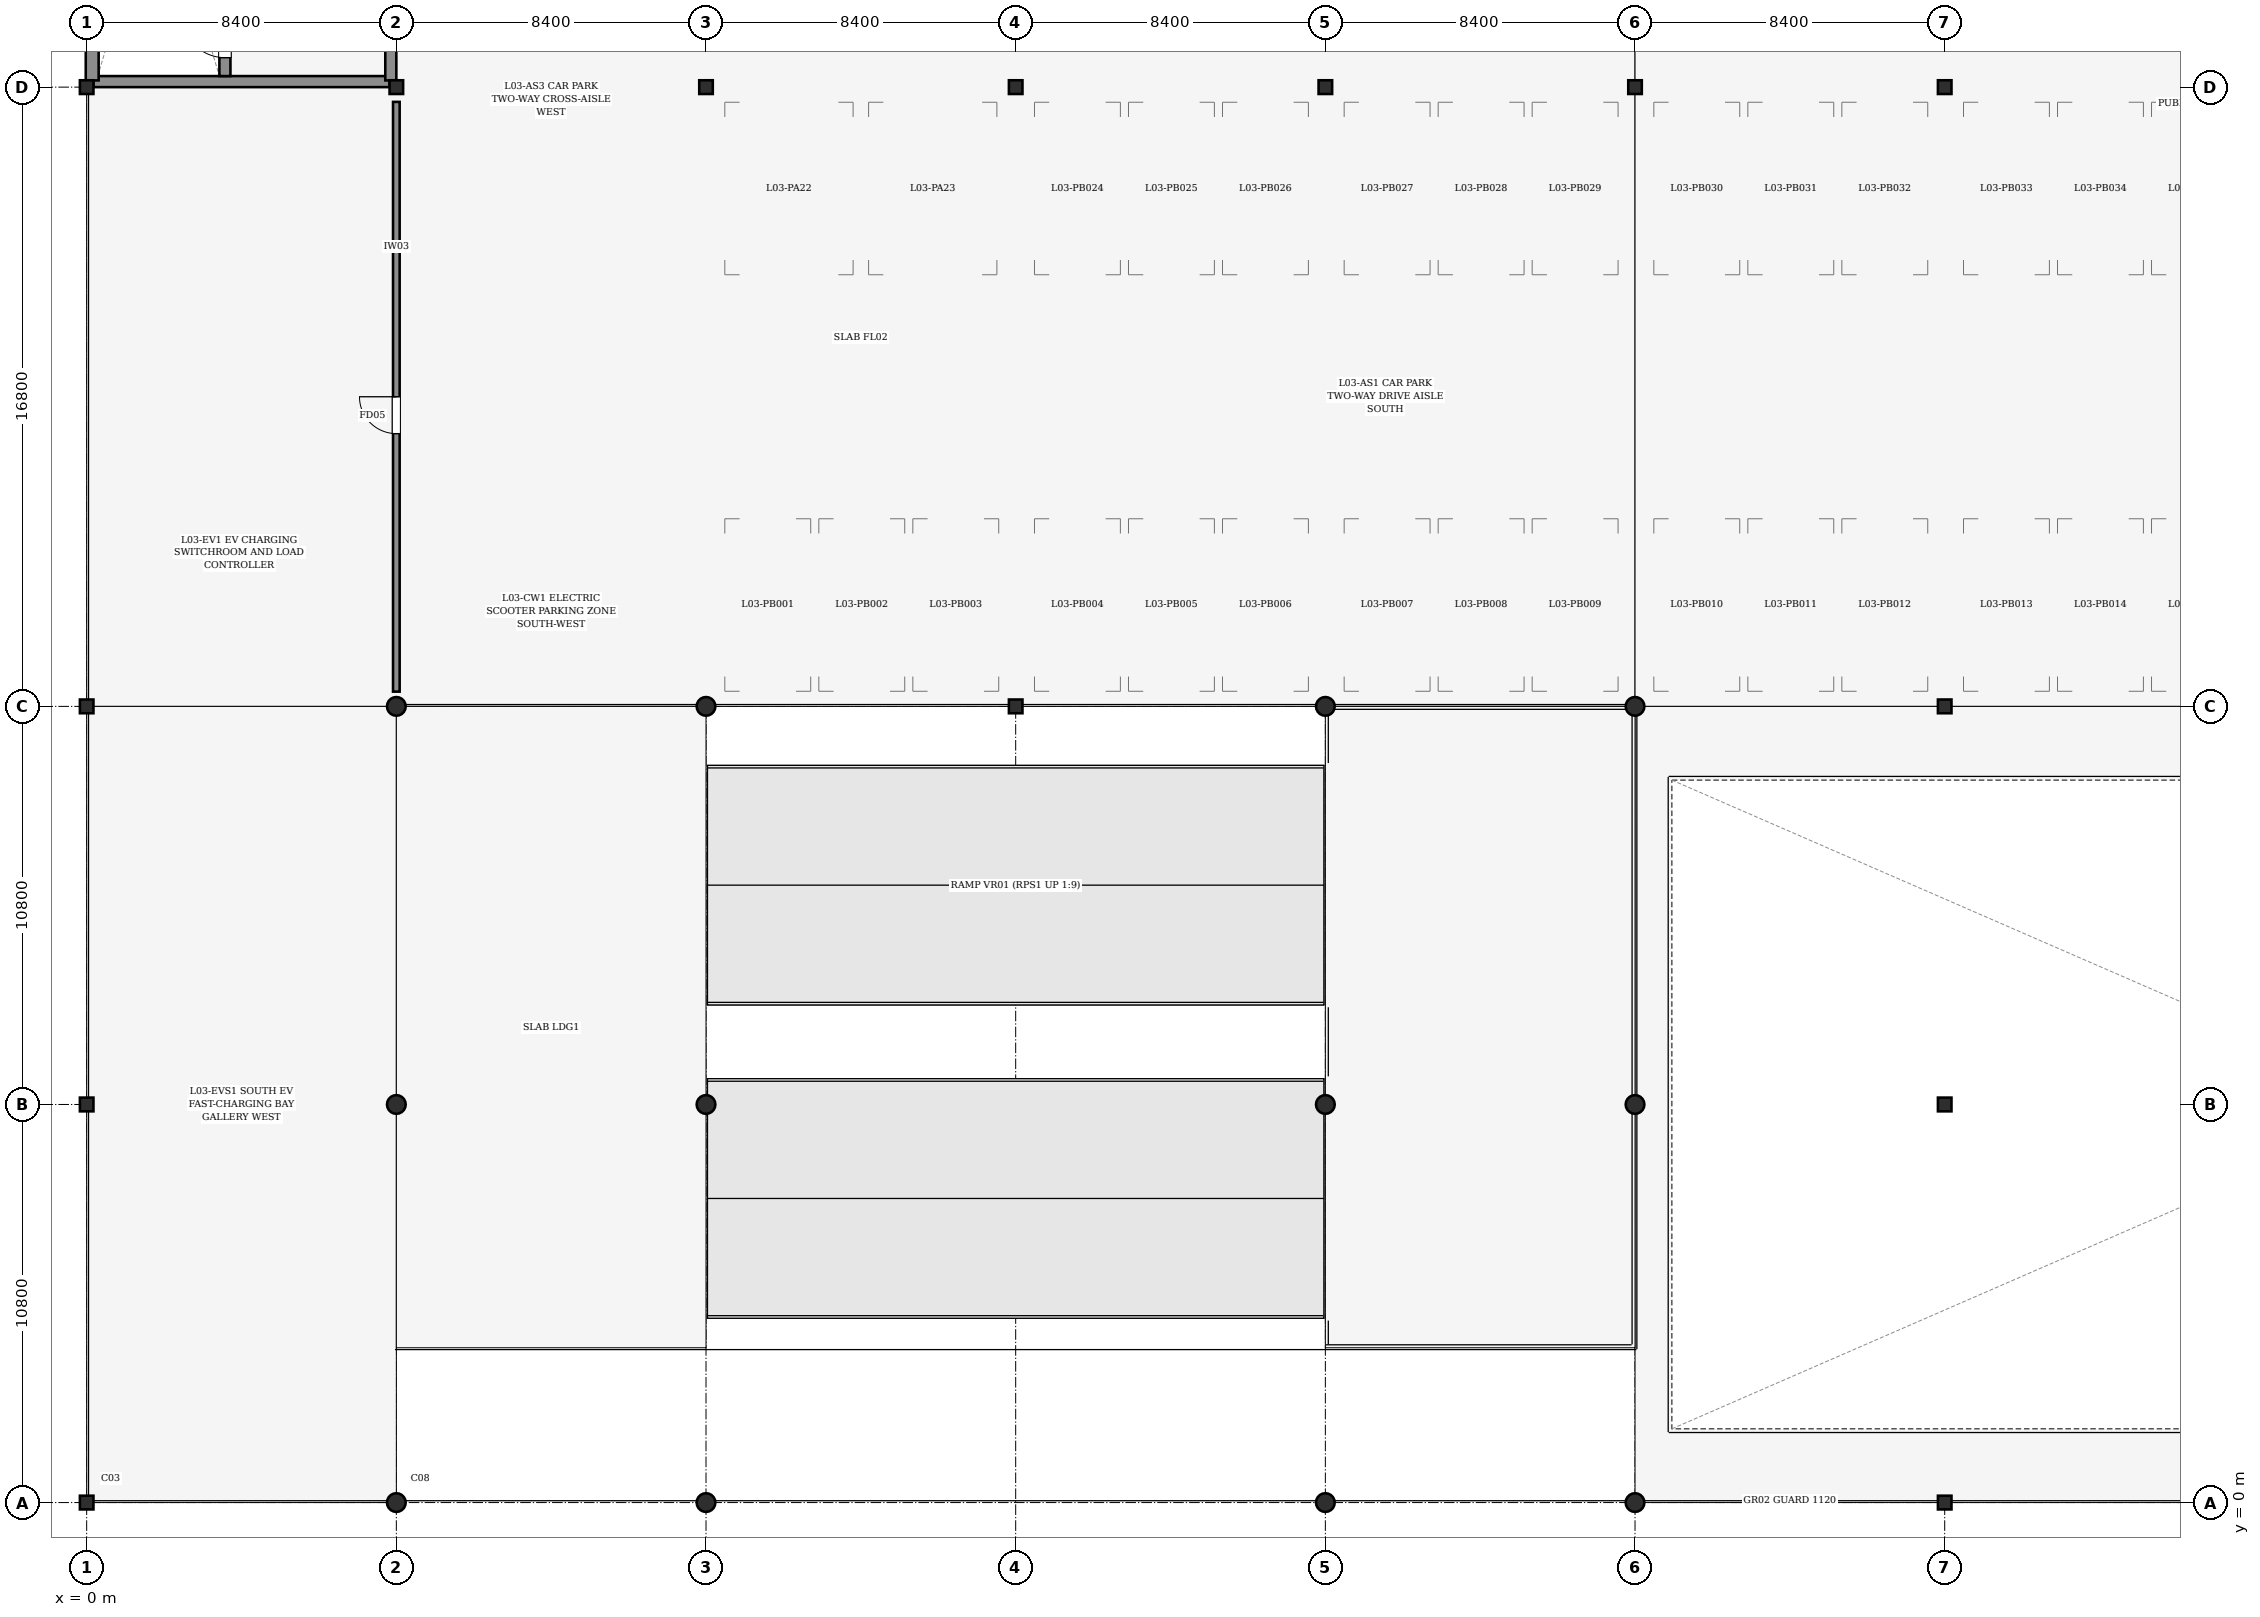
"""IFC4 building model, lengths in metres.
Left out: names, types, materials, properties, quantities, classifications, styles, units other than length and angle.
Written with IfcOpenShell. Run it as: python <this file> out.ifc"""

import sys

from ifc_helpers import new_model, si_unit, direction, frame, frame_2d, origin, origin_2d, place, context, subcontext, project, spatial, rectangle, hollow_circle, i_section, extrude, element, fill, save


model = new_model("IFC4")
c1 = context("Model", 3, precision=1e-05, world=origin(), true_north=direction((0.0, 1.0)))
c2 = subcontext(c1, "Body", "Model", "MODEL_VIEW")
j1 = project(units=[si_unit("LENGTHUNIT", "METRE"), si_unit("PLANEANGLEUNIT", "RADIAN")], contexts=[c1])
p1 = place(None, origin())
s1 = spatial("IfcSite", under=j1, at=p1, CompositionType="ELEMENT")
p2 = place(p1, origin())
s2 = spatial("IfcBuilding", under=s1, at=p2, CompositionType="ELEMENT")
p3 = place(p2, frame((0.0, 0.0, 12.6)))
s3 = spatial("IfcBuildingStorey", under=s2, at=p3, CompositionType="ELEMENT", Elevation=12.6)
for number, where, z_axis, x_axis in (
    (1, (0.0, 0.0, 0.0), (0.0, 0.0, 1.0), (1.0, 0.0, 0.0)),
    (2, (0.0, 10.8, 0.0), (0.0, 0.0, 1.0), (1.0, 0.0, 0.0)),
    (3, (0.0, 21.6, 0.0), (0.0, 0.0, 1.0), (1.0, 0.0, 0.0)),
    (4, (0.0, 38.4, 0.0), (0.0, 0.0, 1.0), (1.0, 0.0, 0.0)),
):
    element("IfcColumn", number, at=place(p3, frame(where, z_axis=z_axis, x_axis=x_axis)), inside=s3, PredefinedType="COLUMN", context=c2, shape_type="SweptSolid", body=[
        extrude(i_section(OverallWidth=0.373, OverallDepth=0.368, WebThickness=0.014, FlangeThickness=0.024, FilletRadius=0.015, at=origin_2d()), origin(), (0.0, 0.0, 1.0), 3.6),
    ])
for number, where, z_axis, x_axis in (
    (5, (8.4, 0.0, 0.0), (0.0, 0.0, 1.0), (1.0, 0.0, 0.0)),
    (6, (8.4, 10.8, 0.0), (0.0, 0.0, 1.0), (1.0, 0.0, 0.0)),
    (7, (8.4, 21.6, 0.0), (0.0, 0.0, 1.0), (1.0, 0.0, 0.0)),
):
    element("IfcColumn", number, at=place(p3, frame(where, z_axis=z_axis, x_axis=x_axis)), inside=s3, PredefinedType="COLUMN", context=c2, shape_type="SweptSolid", body=[
        extrude(hollow_circle(Radius=0.254, WallThickness=0.016, at=origin_2d()), origin(), (0.0, 0.0, 1.0), 3.6),
    ])
p4 = place(p3, frame((8.4, 38.4, 0.0), z_axis=(0.0, 0.0, 1.0), x_axis=(1.0, 0.0, 0.0)))
e8 = element("IfcColumn", 8, at=p4, inside=s3, PredefinedType="COLUMN", context=c2, shape_type="SweptSolid", body=[
    extrude(i_section(OverallWidth=0.373, OverallDepth=0.368, WebThickness=0.014, FlangeThickness=0.024, FilletRadius=0.015, at=origin_2d()), origin(), (0.0, 0.0, 1.0), 3.6),
])
for number, where, z_axis, x_axis in (
    (9, (16.8, 0.0, 0.0), (0.0, 0.0, 1.0), (1.0, 0.0, 0.0)),
    (10, (16.8, 10.8, 0.0), (0.0, 0.0, 1.0), (1.0, 0.0, 0.0)),
    (11, (16.8, 21.6, 0.0), (0.0, 0.0, 1.0), (1.0, 0.0, 0.0)),
):
    element("IfcColumn", number, at=place(p3, frame(where, z_axis=z_axis, x_axis=x_axis)), inside=s3, PredefinedType="COLUMN", context=c2, shape_type="SweptSolid", body=[
        extrude(hollow_circle(Radius=0.254, WallThickness=0.016, at=origin_2d()), origin(), (0.0, 0.0, 1.0), 3.6),
    ])
for number, where, z_axis, x_axis in (
    (12, (16.8, 38.4, 0.0), (0.0, 0.0, 1.0), (1.0, 0.0, 0.0)),
    (13, (25.2, 21.6, 0.0), (0.0, 0.0, 1.0), (1.0, 0.0, 0.0)),
    (14, (25.2, 38.4, 0.0), (0.0, 0.0, 1.0), (1.0, 0.0, 0.0)),
):
    element("IfcColumn", number, at=place(p3, frame(where, z_axis=z_axis, x_axis=x_axis)), inside=s3, PredefinedType="COLUMN", context=c2, shape_type="SweptSolid", body=[
        extrude(i_section(OverallWidth=0.373, OverallDepth=0.368, WebThickness=0.014, FlangeThickness=0.024, FilletRadius=0.015, at=origin_2d()), origin(), (0.0, 0.0, 1.0), 3.6),
    ])
for number, where, z_axis, x_axis in (
    (15, (33.6, 0.0, 0.0), (0.0, 0.0, 1.0), (1.0, 0.0, 0.0)),
    (16, (33.6, 10.8, 0.0), (0.0, 0.0, 1.0), (1.0, 0.0, 0.0)),
    (17, (33.6, 21.6, 0.0), (0.0, 0.0, 1.0), (1.0, 0.0, 0.0)),
):
    element("IfcColumn", number, at=place(p3, frame(where, z_axis=z_axis, x_axis=x_axis)), inside=s3, PredefinedType="COLUMN", context=c2, shape_type="SweptSolid", body=[
        extrude(hollow_circle(Radius=0.254, WallThickness=0.016, at=origin_2d()), origin(), (0.0, 0.0, 1.0), 3.6),
    ])
p5 = place(p3, frame((33.6, 38.4, 0.0), z_axis=(0.0, 0.0, 1.0), x_axis=(1.0, 0.0, 0.0)))
e18 = element("IfcColumn", 18, at=p5, inside=s3, PredefinedType="COLUMN", context=c2, shape_type="SweptSolid", body=[
    extrude(i_section(OverallWidth=0.373, OverallDepth=0.368, WebThickness=0.014, FlangeThickness=0.024, FilletRadius=0.015, at=origin_2d()), origin(), (0.0, 0.0, 1.0), 3.6),
])
for number, where, z_axis, x_axis in (
    (19, (42.0, 0.0, 0.0), (0.0, 0.0, 1.0), (1.0, 0.0, 0.0)),
    (20, (42.0, 10.8, 0.0), (0.0, 0.0, 1.0), (1.0, 0.0, 0.0)),
    (21, (42.0, 21.6, 0.0), (0.0, 0.0, 1.0), (1.0, 0.0, 0.0)),
):
    element("IfcColumn", number, at=place(p3, frame(where, z_axis=z_axis, x_axis=x_axis)), inside=s3, PredefinedType="COLUMN", context=c2, shape_type="SweptSolid", body=[
        extrude(hollow_circle(Radius=0.254, WallThickness=0.016, at=origin_2d()), origin(), (0.0, 0.0, 1.0), 3.6),
    ])
for number, where, z_axis, x_axis in (
    (22, (42.0, 38.4, 0.0), (0.0, 0.0, 1.0), (1.0, 0.0, 0.0)),
    (23, (50.4, 0.0, 0.0), (0.0, 0.0, 1.0), (1.0, 0.0, 0.0)),
    (24, (50.4, 10.8, 0.0), (0.0, 0.0, 1.0), (1.0, 0.0, 0.0)),
    (25, (50.4, 21.6, 0.0), (0.0, 0.0, 1.0), (1.0, 0.0, 0.0)),
    (26, (50.4, 38.4, 0.0), (0.0, 0.0, 1.0), (1.0, 0.0, 0.0)),
):
    element("IfcColumn", number, at=place(p3, frame(where, z_axis=z_axis, x_axis=x_axis)), inside=s3, PredefinedType="COLUMN", context=c2, shape_type="SweptSolid", body=[
        extrude(i_section(OverallWidth=0.373, OverallDepth=0.368, WebThickness=0.014, FlangeThickness=0.024, FilletRadius=0.015, at=origin_2d()), origin(), (0.0, 0.0, 1.0), 3.6),
    ])
p6 = place(p3, frame((0.185, 38.55, 0.0), z_axis=(0.0, 0.0, 1.0), x_axis=(1.0, 0.0, 0.0)))
e27 = element("IfcWall", 27, at=p6, inside=s3, PredefinedType="SHEAR", context=c2, shape_type="SweptSolid", body=[
    extrude(rectangle(XDim=8.031, YDim=0.3, at=frame_2d((4.016, 0.0))), origin(), (0.0, 0.0, 1.0), 3.38),
])
p7 = place(p3, frame((0.15, 38.582, 0.0), z_axis=(0.0, 0.0, 1.0), x_axis=(0.0, 1.0, 0.0)))
e28 = element("IfcWall", 28, at=p7, inside=s3, PredefinedType="SHEAR", context=c2, shape_type="SweptSolid", body=[
    extrude(rectangle(XDim=16.436, YDim=0.35, at=frame_2d((8.218, 0.0))), origin(), (0.0, 0.0, 1.0), 3.38),
])
p8 = place(p3, frame((8.25, 38.582, 0.0), z_axis=(0.0, 0.0, 1.0), x_axis=(0.0, 1.0, 0.0)))
e29 = element("IfcWall", 29, at=p8, inside=s3, PredefinedType="SHEAR", context=c2, shape_type="SweptSolid", body=[
    extrude(rectangle(XDim=16.436, YDim=0.3, at=frame_2d((8.218, 0.0))), origin(), (0.0, 0.0, 1.0), 3.38),
])
p9 = place(p8, frame((5.668, 0.0, 0.0)))
e30 = element("IfcOpeningElement", 30, at=p9, cuts=e29, PredefinedType="OPENING", context=c2, shape_type="SweptSolid", body=[
    extrude(rectangle(XDim=1.3, YDim=2.2, at=frame_2d((0.65, 1.1))), frame((0.0, 0.16, 0.0), z_axis=(0.0, -1.0, 0.0), x_axis=(1.0, 0.0, 0.0)), (0.0, 0.0, 1.0), 0.32),
])
p10 = place(p3, frame((3.75, 38.7, 0.0), z_axis=(0.0, 0.0, 1.0), x_axis=(0.0, 1.0, 0.0)))
e31 = element("IfcWall", 31, at=p10, inside=s3, PredefinedType="SHEAR", context=c2, shape_type="SweptSolid", body=[
    extrude(rectangle(XDim=16.2, YDim=0.3, at=frame_2d((8.1, 0.0))), origin(), (0.0, 0.0, 1.0), 3.38),
])
p11 = place(p10, frame((0.5, 0.0, 0.0)))
e32 = element("IfcOpeningElement", 32, at=p11, cuts=e31, PredefinedType="OPENING", context=c2, shape_type="SweptSolid", body=[
    extrude(rectangle(XDim=1.15, YDim=2.15, at=frame_2d((0.575, 1.075))), frame((0.0, 0.16, 0.0), z_axis=(0.0, -1.0, 0.0), x_axis=(1.0, 0.0, 0.0)), (0.0, 0.0, 1.0), 0.32),
])
p12 = place(p3, frame((8.4, 22.0, 0.0), z_axis=(0.0, 0.0, 1.0), x_axis=(0.0, 1.0, 0.0)))
e33 = element("IfcWall", 33, at=p12, inside=s3, PredefinedType="PARTITIONING", context=c2, shape_type="SweptSolid", body=[
    extrude(rectangle(XDim=16.0, YDim=0.18, at=frame_2d((8.0, 0.0))), origin(), (0.0, 0.0, 1.0), 2.525),
])
p13 = place(p12, frame((7.0, 0.0, 0.0)))
e34 = element("IfcOpeningElement", 34, at=p13, cuts=e33, PredefinedType="OPENING", context=c2, shape_type="SweptSolid", body=[
    extrude(rectangle(XDim=1.0, YDim=2.15, at=frame_2d((0.5, 1.075))), frame((0.0, 0.1, 0.0), z_axis=(0.0, -1.0, 0.0), x_axis=(1.0, 0.0, 0.0)), (0.0, 0.0, 1.0), 0.2),
])
p14 = place(p11, frame((1.15, 0.0, 0.0), z_axis=(0.0, 0.0, 1.0), x_axis=(-1.0, 0.0, 0.0)))
e35 = element("IfcDoor", 35, at=p14, inside=s3, OperationType="SINGLE_SWING_LEFT", PredefinedType="DOOR", context=c2, shape_type="SweptSolid", body=[
    extrude(rectangle(XDim=1.15, YDim=2.15, at=frame_2d((0.575, 1.075))), frame((0.0, 0.025, 0.0), z_axis=(0.0, -1.0, 0.0), x_axis=(1.0, 0.0, 0.0)), (0.0, 0.0, 1.0), 0.05),
])
fill(e32, e35)
p15 = place(p13, origin())
e36 = element("IfcDoor", 36, at=p15, inside=s3, OperationType="SINGLE_SWING_RIGHT", PredefinedType="DOOR", context=c2, shape_type="SweptSolid", body=[
    extrude(rectangle(XDim=1.0, YDim=2.15, at=frame_2d((0.5, 1.075))), frame((0.0, 0.025, 0.0), z_axis=(0.0, -1.0, 0.0), x_axis=(1.0, 0.0, 0.0)), (0.0, 0.0, 1.0), 0.05),
])
fill(e34, e36)
save(model, sys.argv[1])
